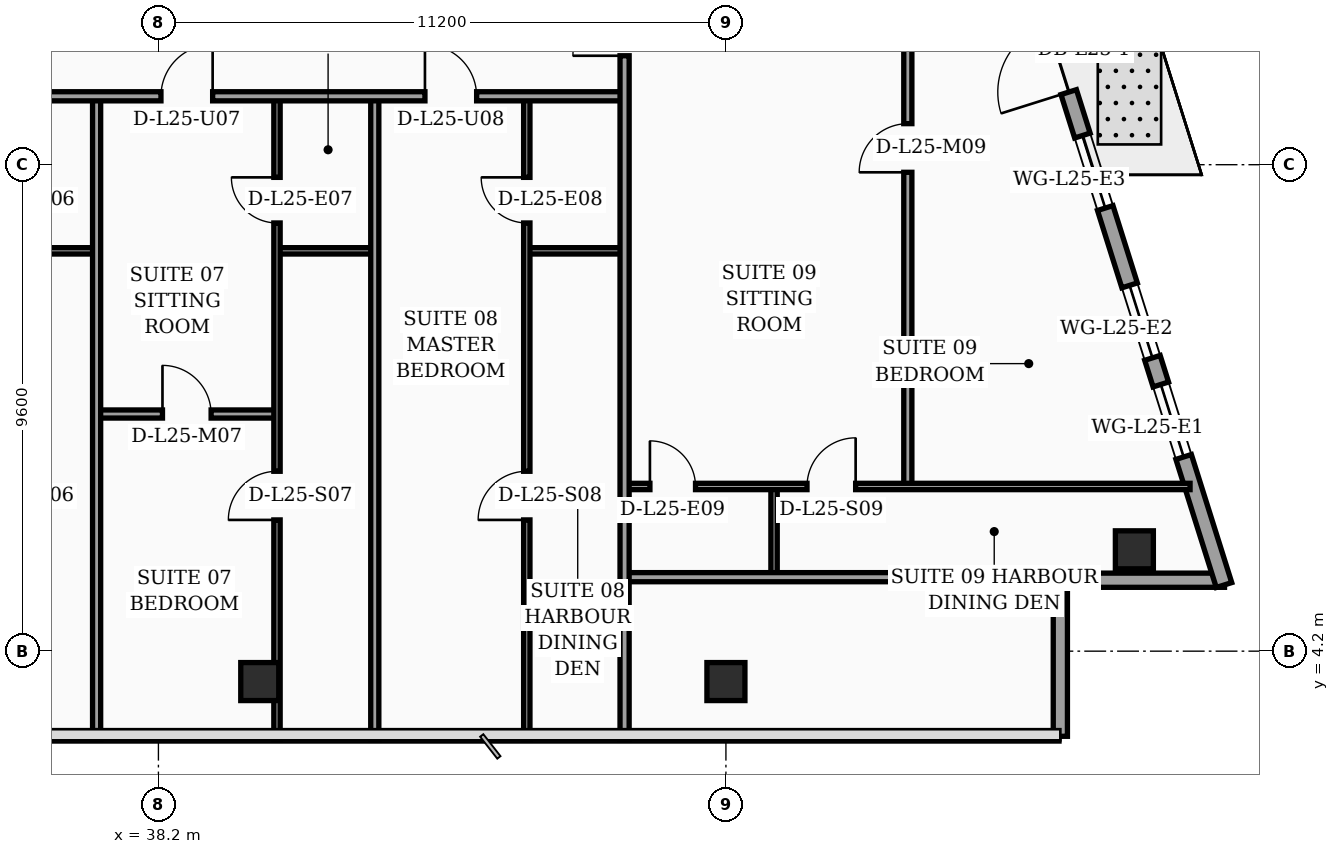
"""IFC4 building model, lengths in metres.
Left out: names, types, materials, properties, quantities, classifications, styles, units other than length and angle.
Written with IfcOpenShell. Run it as: python <this file> out.ifc"""

import sys

from ifc_helpers import new_model, si_unit, direction, frame, frame_2d, origin, origin_2d, place, context, subcontext, project, spatial, rectangle, hollow_rectangle, extrude, element, fill, save


model = new_model("IFC4")
c1 = context("Model", 3, precision=1e-05, world=origin(), true_north=direction((0.0, 1.0)))
c2 = subcontext(c1, "Body", "Model", "MODEL_VIEW")
j1 = project(units=[si_unit("LENGTHUNIT", "METRE"), si_unit("PLANEANGLEUNIT", "RADIAN")], contexts=[c1])
p1 = place(None, origin())
s1 = spatial("IfcSite", under=j1, at=p1, CompositionType="ELEMENT")
p2 = place(p1, origin())
s2 = spatial("IfcBuilding", under=s1, at=p2, CompositionType="ELEMENT")
p3 = place(p2, frame((0.0, 0.0, 105.0)))
s3 = spatial("IfcBuildingStorey", under=s2, at=p3, CompositionType="ELEMENT", Elevation=105.0)
for number, where, z_axis, x_axis in (
    (1, (40.2, 3.6, 0.0), (0.0, 0.0, 1.0), (1.0, 0.0, 0.0)),
    (2, (49.4, 3.6, 0.0), (0.0, 0.0, 1.0), (1.0, 0.0, 0.0)),
    (3, (57.461, 6.2, 0.0), (0.0, 0.0, 1.0), (1.0, 0.0, 0.0)),
):
    element("IfcColumn", number, at=place(p3, frame(where, z_axis=z_axis, x_axis=x_axis)), inside=s3, PredefinedType="COLUMN", context=c2, shape_type="SweptSolid", body=[
        extrude(hollow_rectangle(XDim=0.75, YDim=0.75, WallThickness=0.032, at=origin_2d()), origin(), (0.0, 0.0, 1.0), 3.56),
    ])
p4 = place(p3, frame((56.0, 2.52, 0.0), z_axis=(0.0, 0.0, 1.0), x_axis=(0.0, 1.0, 0.0)))
e4 = element("IfcWall", 4, at=p4, inside=s3, PredefinedType="SOLIDWALL", context=c2, shape_type="SweptSolid", body=[
    extrude(rectangle(XDim=2.94, YDim=0.28, at=frame_2d((1.47, 0.0))), origin(), (0.0, 0.0, 1.0), 3.04),
])
p5 = place(p3, frame((55.86, 5.6, 0.0), z_axis=(0.0, 0.0, 1.0), x_axis=(1.0, 0.0, 0.0)))
e5 = element("IfcWall", 5, at=p5, inside=s3, PredefinedType="SOLIDWALL", context=c2, shape_type="SweptSolid", body=[
    extrude(rectangle(XDim=3.38, YDim=0.28, at=frame_2d((1.69, 0.0))), origin(), (0.0, 0.0, 1.0), 3.04),
])
p6 = place(p3, frame((59.23, 5.505, 0.0), z_axis=(0.0, 0.0, 1.0), x_axis=(-0.300509063924, 0.953778958931, 0.0)))
e6 = element("IfcWall", 6, at=p6, inside=s3, PredefinedType="SOLIDWALL", context=c2, shape_type="SweptSolid", body=[
    extrude(rectangle(XDim=30.814, YDim=0.32, at=frame_2d((15.407, 0.0))), origin(), (0.0, 0.0, 1.0), 3.56),
])
p7 = place(p6, frame((10.199, 0.0, 0.0)))
e7 = element("IfcOpeningElement", 7, at=p7, cuts=e6, PredefinedType="OPENING", context=c2, shape_type="SweptSolid", body=[
    extrude(rectangle(XDim=1.4, YDim=2.25, at=frame_2d((0.7, 1.125))), frame((0.0, 0.17, 0.0), z_axis=(0.0, -1.0, 0.0), x_axis=(1.0, 0.0, 0.0)), (0.0, 0.0, 1.0), 0.34),
])
p8 = place(p6, frame((2.65, 0.0, 0.75)))
e8 = element("IfcOpeningElement", 8, at=p8, cuts=e6, PredefinedType="OPENING", context=c2, shape_type="SweptSolid", body=[
    extrude(rectangle(XDim=1.5, YDim=1.6, at=frame_2d((0.75, 0.8))), frame((0.0, 0.17, 0.0), z_axis=(0.0, -1.0, 0.0), x_axis=(1.0, 0.0, 0.0)), (0.0, 0.0, 1.0), 0.34),
])
p9 = place(p6, frame((4.7, 0.0, 0.75)))
e9 = element("IfcOpeningElement", 9, at=p9, cuts=e6, PredefinedType="OPENING", context=c2, shape_type="SweptSolid", body=[
    extrude(rectangle(XDim=1.5, YDim=1.6, at=frame_2d((0.75, 0.8))), frame((0.0, 0.17, 0.0), z_axis=(0.0, -1.0, 0.0), x_axis=(1.0, 0.0, 0.0)), (0.0, 0.0, 1.0), 0.34),
])
p10 = place(p6, frame((7.8, 0.0, 0.75)))
e10 = element("IfcOpeningElement", 10, at=p10, cuts=e6, PredefinedType="OPENING", context=c2, shape_type="SweptSolid", body=[
    extrude(rectangle(XDim=1.5, YDim=1.6, at=frame_2d((0.75, 0.8))), frame((0.0, 0.17, 0.0), z_axis=(0.0, -1.0, 0.0), x_axis=(1.0, 0.0, 0.0)), (0.0, 0.0, 1.0), 0.34),
])
p11 = place(p6, frame((14.0, 0.0, 0.75)))
e11 = element("IfcOpeningElement", 11, at=p11, cuts=e6, PredefinedType="OPENING", context=c2, shape_type="SweptSolid", body=[
    extrude(rectangle(XDim=1.5, YDim=1.6, at=frame_2d((0.75, 0.8))), frame((0.0, 0.17, 0.0), z_axis=(0.0, -1.0, 0.0), x_axis=(1.0, 0.0, 0.0)), (0.0, 0.0, 1.0), 0.34),
])
p12 = place(p6, frame((17.1, 0.0, 0.75)))
e12 = element("IfcOpeningElement", 12, at=p12, cuts=e6, PredefinedType="OPENING", context=c2, shape_type="SweptSolid", body=[
    extrude(rectangle(XDim=1.5, YDim=1.6, at=frame_2d((0.75, 0.8))), frame((0.0, 0.17, 0.0), z_axis=(0.0, -1.0, 0.0), x_axis=(1.0, 0.0, 0.0)), (0.0, 0.0, 1.0), 0.34),
])
p13 = place(p6, frame((20.2, 0.0, 0.75)))
e13 = element("IfcOpeningElement", 13, at=p13, cuts=e6, PredefinedType="OPENING", context=c2, shape_type="SweptSolid", body=[
    extrude(rectangle(XDim=1.5, YDim=1.6, at=frame_2d((0.75, 0.8))), frame((0.0, 0.17, 0.0), z_axis=(0.0, -1.0, 0.0), x_axis=(1.0, 0.0, 0.0)), (0.0, 0.0, 1.0), 0.34),
])
p14 = place(p6, frame((26.4, 0.0, 0.75)))
e14 = element("IfcOpeningElement", 14, at=p14, cuts=e6, PredefinedType="OPENING", context=c2, shape_type="SweptSolid", body=[
    extrude(rectangle(XDim=1.5, YDim=1.6, at=frame_2d((0.75, 0.8))), frame((0.0, 0.17, 0.0), z_axis=(0.0, -1.0, 0.0), x_axis=(1.0, 0.0, 0.0)), (0.0, 0.0, 1.0), 0.34),
])
p15 = place(p3, frame((35.05, 12.1, 0.0), z_axis=(0.0, 0.0, 1.0), x_axis=(1.0, 0.0, 0.0)))
e15 = element("IfcWall", 15, at=p15, inside=s3, PredefinedType="PARTITIONING", context=c2, shape_type="SweptSolid", body=[
    extrude(rectangle(XDim=1.93, YDim=0.125, at=frame_2d((0.965, 0.0))), origin(), (0.0, 0.0, 1.0), 2.84),
])
p16 = place(p3, frame((40.54, 12.1, 0.0), z_axis=(0.0, 0.0, 1.0), x_axis=(1.0, 0.0, 0.0)))
e16 = element("IfcWall", 16, at=p16, inside=s3, PredefinedType="PARTITIONING", context=c2, shape_type="SweptSolid", body=[
    extrude(rectangle(XDim=1.93, YDim=0.125, at=frame_2d((0.965, 0.0))), origin(), (0.0, 0.0, 1.0), 3.56),
])
p17 = place(p3, frame((36.98, 8.88, 0.0), z_axis=(0.0, 0.0, 1.0), x_axis=(1.0, 0.0, 0.0)))
e17 = element("IfcWall", 17, at=p17, inside=s3, PredefinedType="PARTITIONING", context=c2, shape_type="SweptSolid", body=[
    extrude(rectangle(XDim=3.56, YDim=0.16, at=frame_2d((1.78, 0.0))), origin(), (0.0, 0.0, 1.0), 2.84),
])
p18 = place(p17, frame((1.3, 0.0, 0.0)))
e18 = element("IfcOpeningElement", 18, at=p18, cuts=e17, PredefinedType="OPENING", context=c2, shape_type="SweptSolid", body=[
    extrude(rectangle(XDim=0.96, YDim=2.2, at=frame_2d((0.48, 1.1))), frame((0.0, 0.09, 0.0), z_axis=(0.0, -1.0, 0.0), x_axis=(1.0, 0.0, 0.0)), (0.0, 0.0, 1.0), 0.18),
])
p19 = place(p3, frame((40.54, 2.44, 0.0), z_axis=(0.0, 0.0, 1.0), x_axis=(0.0, 1.0, 0.0)))
e19 = element("IfcWall", 19, at=p19, inside=s3, PredefinedType="PARTITIONING", context=c2, shape_type="SweptSolid", body=[
    extrude(rectangle(XDim=12.71, YDim=0.125, at=frame_2d((6.355, 0.0))), origin(), (0.0, 0.0, 1.0), 2.84),
])
p20 = place(p19, frame((4.35, 0.0, 0.0)))
e20 = element("IfcOpeningElement", 20, at=p20, cuts=e19, PredefinedType="OPENING", context=c2, shape_type="SweptSolid", body=[
    extrude(rectangle(XDim=0.96, YDim=2.2, at=frame_2d((0.48, 1.1))), frame((0.0, 0.073, 0.0), z_axis=(0.0, -1.0, 0.0), x_axis=(1.0, 0.0, 0.0)), (0.0, 0.0, 1.0), 0.145),
])
p21 = place(p19, frame((10.21, 0.0, 0.0)))
e21 = element("IfcOpeningElement", 21, at=p21, cuts=e19, PredefinedType="OPENING", context=c2, shape_type="SweptSolid", body=[
    extrude(rectangle(XDim=0.9, YDim=2.15, at=frame_2d((0.45, 1.075))), frame((0.0, 0.073, 0.0), z_axis=(0.0, -1.0, 0.0), x_axis=(1.0, 0.0, 0.0)), (0.0, 0.0, 1.0), 0.145),
])
p22 = place(p3, frame((36.98, 2.44, 0.0), z_axis=(0.0, 0.0, 1.0), x_axis=(0.0, 1.0, 0.0)))
e22 = element("IfcWall", 22, at=p22, inside=s3, PredefinedType="PARTITIONING", context=c2, shape_type="SweptSolid", body=[
    extrude(rectangle(XDim=12.71, YDim=0.16, at=frame_2d((6.355, 0.0))), origin(), (0.0, 0.0, 1.0), 2.84),
])
p23 = place(p3, frame((45.47, 12.1, 0.0), z_axis=(0.0, 0.0, 1.0), x_axis=(1.0, 0.0, 0.0)))
e23 = element("IfcWall", 23, at=p23, inside=s3, PredefinedType="PARTITIONING", context=c2, shape_type="SweptSolid", body=[
    extrude(rectangle(XDim=1.93, YDim=0.125, at=frame_2d((0.965, 0.0))), origin(), (0.0, 0.0, 1.0), 2.84),
])
p24 = place(p3, frame((45.47, 2.44, 0.0), z_axis=(0.0, 0.0, 1.0), x_axis=(0.0, 1.0, 0.0)))
e24 = element("IfcWall", 24, at=p24, inside=s3, PredefinedType="PARTITIONING", context=c2, shape_type="SweptSolid", body=[
    extrude(rectangle(XDim=12.71, YDim=0.125, at=frame_2d((6.355, 0.0))), origin(), (0.0, 0.0, 1.0), 3.04),
])
p25 = place(p24, frame((4.35, 0.0, 0.0)))
e25 = element("IfcOpeningElement", 25, at=p25, cuts=e24, PredefinedType="OPENING", context=c2, shape_type="SweptSolid", body=[
    extrude(rectangle(XDim=0.96, YDim=2.2, at=frame_2d((0.48, 1.1))), frame((0.0, 0.073, 0.0), z_axis=(0.0, -1.0, 0.0), x_axis=(1.0, 0.0, 0.0)), (0.0, 0.0, 1.0), 0.145),
])
p26 = place(p24, frame((10.21, 0.0, 0.0)))
e26 = element("IfcOpeningElement", 26, at=p26, cuts=e24, PredefinedType="OPENING", context=c2, shape_type="SweptSolid", body=[
    extrude(rectangle(XDim=0.9, YDim=2.15, at=frame_2d((0.45, 1.075))), frame((0.0, 0.073, 0.0), z_axis=(0.0, -1.0, 0.0), x_axis=(1.0, 0.0, 0.0)), (0.0, 0.0, 1.0), 0.145),
])
p27 = place(p3, frame((42.47, 2.44, 0.0), z_axis=(0.0, 0.0, 1.0), x_axis=(0.0, 1.0, 0.0)))
e27 = element("IfcWall", 27, at=p27, inside=s3, PredefinedType="PARTITIONING", context=c2, shape_type="SweptSolid", body=[
    extrude(rectangle(XDim=12.71, YDim=0.16, at=frame_2d((6.355, 0.0))), origin(), (0.0, 0.0, 1.0), 3.04),
])
p28 = place(p3, frame((32.4, 15.15, 0.0), z_axis=(0.0, 0.0, 1.0), x_axis=(1.0, 0.0, 0.0)))
e28 = element("IfcWall", 28, at=p28, inside=s3, PredefinedType="PARTITIONING", context=c2, shape_type="SweptSolid", body=[
    extrude(rectangle(XDim=15.0, YDim=0.18, at=frame_2d((7.5, 0.0))), origin(), (0.0, 0.0, 1.0), 2.84),
])
p29 = place(p28, frame((0.91, 0.0, 0.0)))
e29 = element("IfcOpeningElement", 29, at=p29, cuts=e28, PredefinedType="OPENING", context=c2, shape_type="SweptSolid", body=[
    extrude(rectangle(XDim=1.02, YDim=2.2, at=frame_2d((0.51, 1.1))), frame((0.0, 0.1, 0.0), z_axis=(0.0, -1.0, 0.0), x_axis=(1.0, 0.0, 0.0)), (0.0, 0.0, 1.0), 0.2),
])
p30 = place(p28, frame((5.85, 0.0, 0.0)))
e30 = element("IfcOpeningElement", 30, at=p30, cuts=e28, PredefinedType="OPENING", context=c2, shape_type="SweptSolid", body=[
    extrude(rectangle(XDim=1.02, YDim=2.2, at=frame_2d((0.51, 1.1))), frame((0.0, 0.1, 0.0), z_axis=(0.0, -1.0, 0.0), x_axis=(1.0, 0.0, 0.0)), (0.0, 0.0, 1.0), 0.2),
])
p31 = place(p28, frame((11.06, 0.0, 0.0)))
e31 = element("IfcOpeningElement", 31, at=p31, cuts=e28, PredefinedType="OPENING", context=c2, shape_type="SweptSolid", body=[
    extrude(rectangle(XDim=1.02, YDim=2.2, at=frame_2d((0.51, 1.1))), frame((0.0, 0.1, 0.0), z_axis=(0.0, -1.0, 0.0), x_axis=(1.0, 0.0, 0.0)), (0.0, 0.0, 1.0), 0.2),
])
p32 = place(p3, frame((50.35, 5.66, 0.0), z_axis=(0.0, 0.0, 1.0), x_axis=(0.0, 1.0, 0.0)))
e32 = element("IfcWall", 32, at=p32, inside=s3, PredefinedType="PARTITIONING", context=c2, shape_type="SweptSolid", body=[
    extrude(rectangle(XDim=1.79, YDim=0.125, at=frame_2d((0.895, 0.0))), origin(), (0.0, 0.0, 1.0), 3.56),
])
p33 = place(p3, frame((52.99, 7.45, 0.0), z_axis=(0.0, 0.0, 1.0), x_axis=(0.0, 1.0, 0.0)))
e33 = element("IfcWall", 33, at=p33, inside=s3, PredefinedType="PARTITIONING", context=c2, shape_type="SweptSolid", body=[
    extrude(rectangle(XDim=13.35, YDim=0.16, at=frame_2d((6.675, 0.0))), origin(), (0.0, 0.0, 1.0), 2.84),
])
p34 = place(p33, frame((6.2, 0.0, 0.0)))
e34 = element("IfcOpeningElement", 34, at=p34, cuts=e33, PredefinedType="OPENING", context=c2, shape_type="SweptSolid", body=[
    extrude(rectangle(XDim=0.96, YDim=2.2, at=frame_2d((0.48, 1.1))), frame((0.0, 0.09, 0.0), z_axis=(0.0, -1.0, 0.0), x_axis=(1.0, 0.0, 0.0)), (0.0, 0.0, 1.0), 0.18),
])
p35 = place(p3, frame((47.4, 7.45, 0.0), z_axis=(0.0, 0.0, 1.0), x_axis=(1.0, 0.0, 0.0)))
e35 = element("IfcWall", 35, at=p35, inside=s3, PredefinedType="PARTITIONING", context=c2, shape_type="SweptSolid", body=[
    extrude(rectangle(XDim=11.16, YDim=0.125, at=frame_2d((5.58, 0.0))), origin(), (0.0, 0.0, 1.0), 2.84),
])
p36 = place(p35, frame((0.5, 0.0, 0.0)))
e36 = element("IfcOpeningElement", 36, at=p36, cuts=e35, PredefinedType="OPENING", context=c2, shape_type="SweptSolid", body=[
    extrude(rectangle(XDim=0.9, YDim=2.15, at=frame_2d((0.45, 1.075))), frame((0.0, 0.073, 0.0), z_axis=(0.0, -1.0, 0.0), x_axis=(1.0, 0.0, 0.0)), (0.0, 0.0, 1.0), 0.145),
])
p37 = place(p35, frame((3.6, 0.0, 0.0)))
e37 = element("IfcOpeningElement", 37, at=p37, cuts=e35, PredefinedType="OPENING", context=c2, shape_type="SweptSolid", body=[
    extrude(rectangle(XDim=0.96, YDim=2.2, at=frame_2d((0.48, 1.1))), frame((0.0, 0.073, 0.0), z_axis=(0.0, -1.0, 0.0), x_axis=(1.0, 0.0, 0.0)), (0.0, 0.0, 1.0), 0.145),
])
p38 = place(p3, frame((47.4, 5.66, 0.0), z_axis=(0.0, 0.0, 1.0), x_axis=(1.0, 0.0, 0.0)))
e38 = element("IfcWall", 38, at=p38, inside=s3, PredefinedType="PARTITIONING", context=c2, shape_type="SweptSolid", body=[
    extrude(rectangle(XDim=8.6, YDim=0.18, at=frame_2d((4.3, 0.0))), origin(), (0.0, 0.0, 1.0), 2.84),
])
p39 = place(p3, frame((47.4, 2.44, 0.0), z_axis=(0.0, 0.0, 1.0), x_axis=(0.0, 1.0, 0.0)))
e39 = element("IfcWall", 39, at=p39, inside=s3, PredefinedType="PARTITIONING", context=c2, shape_type="SweptSolid", body=[
    extrude(rectangle(XDim=27.84, YDim=0.18, at=frame_2d((13.92, 0.0))), origin(), (0.0, 0.0, 1.0), 2.84),
])
p40 = place(p39, frame((13.51, 0.0, 0.0)))
e40 = element("IfcOpeningElement", 40, at=p40, cuts=e39, PredefinedType="OPENING", context=c2, shape_type="SweptSolid", body=[
    extrude(rectangle(XDim=1.02, YDim=2.2, at=frame_2d((0.51, 1.1))), frame((0.0, 0.1, 0.0), z_axis=(0.0, -1.0, 0.0), x_axis=(1.0, 0.0, 0.0)), (0.0, 0.0, 1.0), 0.2),
])
p41 = place(p39, frame((21.52, 0.0, 0.0)))
e41 = element("IfcOpeningElement", 41, at=p41, cuts=e39, PredefinedType="OPENING", context=c2, shape_type="SweptSolid", body=[
    extrude(rectangle(XDim=1.02, YDim=2.2, at=frame_2d((0.51, 1.1))), frame((0.0, 0.1, 0.0), z_axis=(0.0, -1.0, 0.0), x_axis=(1.0, 0.0, 0.0)), (0.0, 0.0, 1.0), 0.2),
])
p42 = place(p7, origin())
e42 = element("IfcDoor", 42, at=p42, inside=s3, OperationType="SINGLE_SWING_LEFT", PredefinedType="DOOR", context=c2, shape_type="SweptSolid", body=[
    extrude(rectangle(XDim=1.4, YDim=2.25, at=frame_2d((0.7, 1.125))), frame((0.0, 0.025, 0.0), z_axis=(0.0, -1.0, 0.0), x_axis=(1.0, 0.0, 0.0)), (0.0, 0.0, 1.0), 0.05),
])
fill(e7, e42)
p43 = place(p8, origin())
e43 = element("IfcWindow", 43, at=p43, inside=s3, PartitioningType="SINGLE_PANEL", PredefinedType="WINDOW", context=c2, shape_type="SweptSolid", body=[
    extrude(rectangle(XDim=1.5, YDim=1.6, at=frame_2d((0.75, 0.8))), frame((0.0, 0.03, 0.0), z_axis=(0.0, -1.0, 0.0), x_axis=(1.0, 0.0, 0.0)), (0.0, 0.0, 1.0), 0.06),
])
fill(e8, e43)
p44 = place(p9, origin())
e44 = element("IfcWindow", 44, at=p44, inside=s3, PartitioningType="SINGLE_PANEL", PredefinedType="WINDOW", context=c2, shape_type="SweptSolid", body=[
    extrude(rectangle(XDim=1.5, YDim=1.6, at=frame_2d((0.75, 0.8))), frame((0.0, 0.03, 0.0), z_axis=(0.0, -1.0, 0.0), x_axis=(1.0, 0.0, 0.0)), (0.0, 0.0, 1.0), 0.06),
])
fill(e9, e44)
p45 = place(p10, origin())
e45 = element("IfcWindow", 45, at=p45, inside=s3, PartitioningType="SINGLE_PANEL", PredefinedType="WINDOW", context=c2, shape_type="SweptSolid", body=[
    extrude(rectangle(XDim=1.5, YDim=1.6, at=frame_2d((0.75, 0.8))), frame((0.0, 0.03, 0.0), z_axis=(0.0, -1.0, 0.0), x_axis=(1.0, 0.0, 0.0)), (0.0, 0.0, 1.0), 0.06),
])
fill(e10, e45)
p46 = place(p18, origin())
e46 = element("IfcDoor", 46, at=p46, inside=s3, OperationType="SINGLE_SWING_LEFT", PredefinedType="DOOR", context=c2, shape_type="SweptSolid", body=[
    extrude(rectangle(XDim=0.96, YDim=2.2, at=frame_2d((0.48, 1.1))), frame((0.0, 0.025, 0.0), z_axis=(0.0, -1.0, 0.0), x_axis=(1.0, 0.0, 0.0)), (0.0, 0.0, 1.0), 0.05),
])
fill(e18, e46)
p47 = place(p20, origin())
e47 = element("IfcDoor", 47, at=p47, inside=s3, OperationType="SINGLE_SWING_LEFT", PredefinedType="DOOR", context=c2, shape_type="SweptSolid", body=[
    extrude(rectangle(XDim=0.96, YDim=2.2, at=frame_2d((0.48, 1.1))), frame((0.0, 0.025, 0.0), z_axis=(0.0, -1.0, 0.0), x_axis=(1.0, 0.0, 0.0)), (0.0, 0.0, 1.0), 0.05),
])
fill(e20, e47)
p48 = place(p21, origin())
e48 = element("IfcDoor", 48, at=p48, inside=s3, OperationType="SINGLE_SWING_RIGHT", PredefinedType="DOOR", context=c2, shape_type="SweptSolid", body=[
    extrude(rectangle(XDim=0.9, YDim=2.15, at=frame_2d((0.45, 1.075))), frame((0.0, 0.025, 0.0), z_axis=(0.0, -1.0, 0.0), x_axis=(1.0, 0.0, 0.0)), (0.0, 0.0, 1.0), 0.05),
])
fill(e21, e48)
p49 = place(p25, origin())
e49 = element("IfcDoor", 49, at=p49, inside=s3, OperationType="SINGLE_SWING_LEFT", PredefinedType="DOOR", context=c2, shape_type="SweptSolid", body=[
    extrude(rectangle(XDim=0.96, YDim=2.2, at=frame_2d((0.48, 1.1))), frame((0.0, 0.025, 0.0), z_axis=(0.0, -1.0, 0.0), x_axis=(1.0, 0.0, 0.0)), (0.0, 0.0, 1.0), 0.05),
])
fill(e25, e49)
p50 = place(p26, origin())
e50 = element("IfcDoor", 50, at=p50, inside=s3, OperationType="SINGLE_SWING_RIGHT", PredefinedType="DOOR", context=c2, shape_type="SweptSolid", body=[
    extrude(rectangle(XDim=0.9, YDim=2.15, at=frame_2d((0.45, 1.075))), frame((0.0, 0.025, 0.0), z_axis=(0.0, -1.0, 0.0), x_axis=(1.0, 0.0, 0.0)), (0.0, 0.0, 1.0), 0.05),
])
fill(e26, e50)
p51 = place(p30, origin())
e51 = element("IfcDoor", 51, at=p51, inside=s3, OperationType="SINGLE_SWING_RIGHT", PredefinedType="DOOR", context=c2, shape_type="SweptSolid", body=[
    extrude(rectangle(XDim=1.02, YDim=2.2, at=frame_2d((0.51, 1.1))), frame((0.0, 0.025, 0.0), z_axis=(0.0, -1.0, 0.0), x_axis=(1.0, 0.0, 0.0)), (0.0, 0.0, 1.0), 0.05),
])
fill(e30, e51)
p52 = place(p31, origin())
e52 = element("IfcDoor", 52, at=p52, inside=s3, OperationType="SINGLE_SWING_LEFT", PredefinedType="DOOR", context=c2, shape_type="SweptSolid", body=[
    extrude(rectangle(XDim=1.02, YDim=2.2, at=frame_2d((0.51, 1.1))), frame((0.0, 0.025, 0.0), z_axis=(0.0, -1.0, 0.0), x_axis=(1.0, 0.0, 0.0)), (0.0, 0.0, 1.0), 0.05),
])
fill(e31, e52)
p53 = place(p34, origin())
e53 = element("IfcDoor", 53, at=p53, inside=s3, OperationType="SINGLE_SWING_LEFT", PredefinedType="DOOR", context=c2, shape_type="SweptSolid", body=[
    extrude(rectangle(XDim=0.96, YDim=2.2, at=frame_2d((0.48, 1.1))), frame((0.0, 0.025, 0.0), z_axis=(0.0, -1.0, 0.0), x_axis=(1.0, 0.0, 0.0)), (0.0, 0.0, 1.0), 0.05),
])
fill(e34, e53)
p54 = place(p36, origin())
e54 = element("IfcDoor", 54, at=p54, inside=s3, OperationType="SINGLE_SWING_LEFT", PredefinedType="DOOR", context=c2, shape_type="SweptSolid", body=[
    extrude(rectangle(XDim=0.9, YDim=2.15, at=frame_2d((0.45, 1.075))), frame((0.0, 0.025, 0.0), z_axis=(0.0, -1.0, 0.0), x_axis=(1.0, 0.0, 0.0)), (0.0, 0.0, 1.0), 0.05),
])
fill(e36, e54)
p55 = place(p37, origin())
e55 = element("IfcDoor", 55, at=p55, inside=s3, OperationType="SINGLE_SWING_RIGHT", PredefinedType="DOOR", context=c2, shape_type="SweptSolid", body=[
    extrude(rectangle(XDim=0.96, YDim=2.2, at=frame_2d((0.48, 1.1))), frame((0.0, 0.025, 0.0), z_axis=(0.0, -1.0, 0.0), x_axis=(1.0, 0.0, 0.0)), (0.0, 0.0, 1.0), 0.05),
])
fill(e37, e55)
p56 = place(p40, origin())
e56 = element("IfcDoor", 56, at=p56, inside=s3, OperationType="SINGLE_SWING_LEFT", PredefinedType="DOOR", context=c2, shape_type="SweptSolid", body=[
    extrude(rectangle(XDim=1.02, YDim=2.2, at=frame_2d((0.51, 1.1))), frame((0.0, 0.025, 0.0), z_axis=(0.0, -1.0, 0.0), x_axis=(1.0, 0.0, 0.0)), (0.0, 0.0, 1.0), 0.05),
])
fill(e40, e56)
save(model, sys.argv[1])
